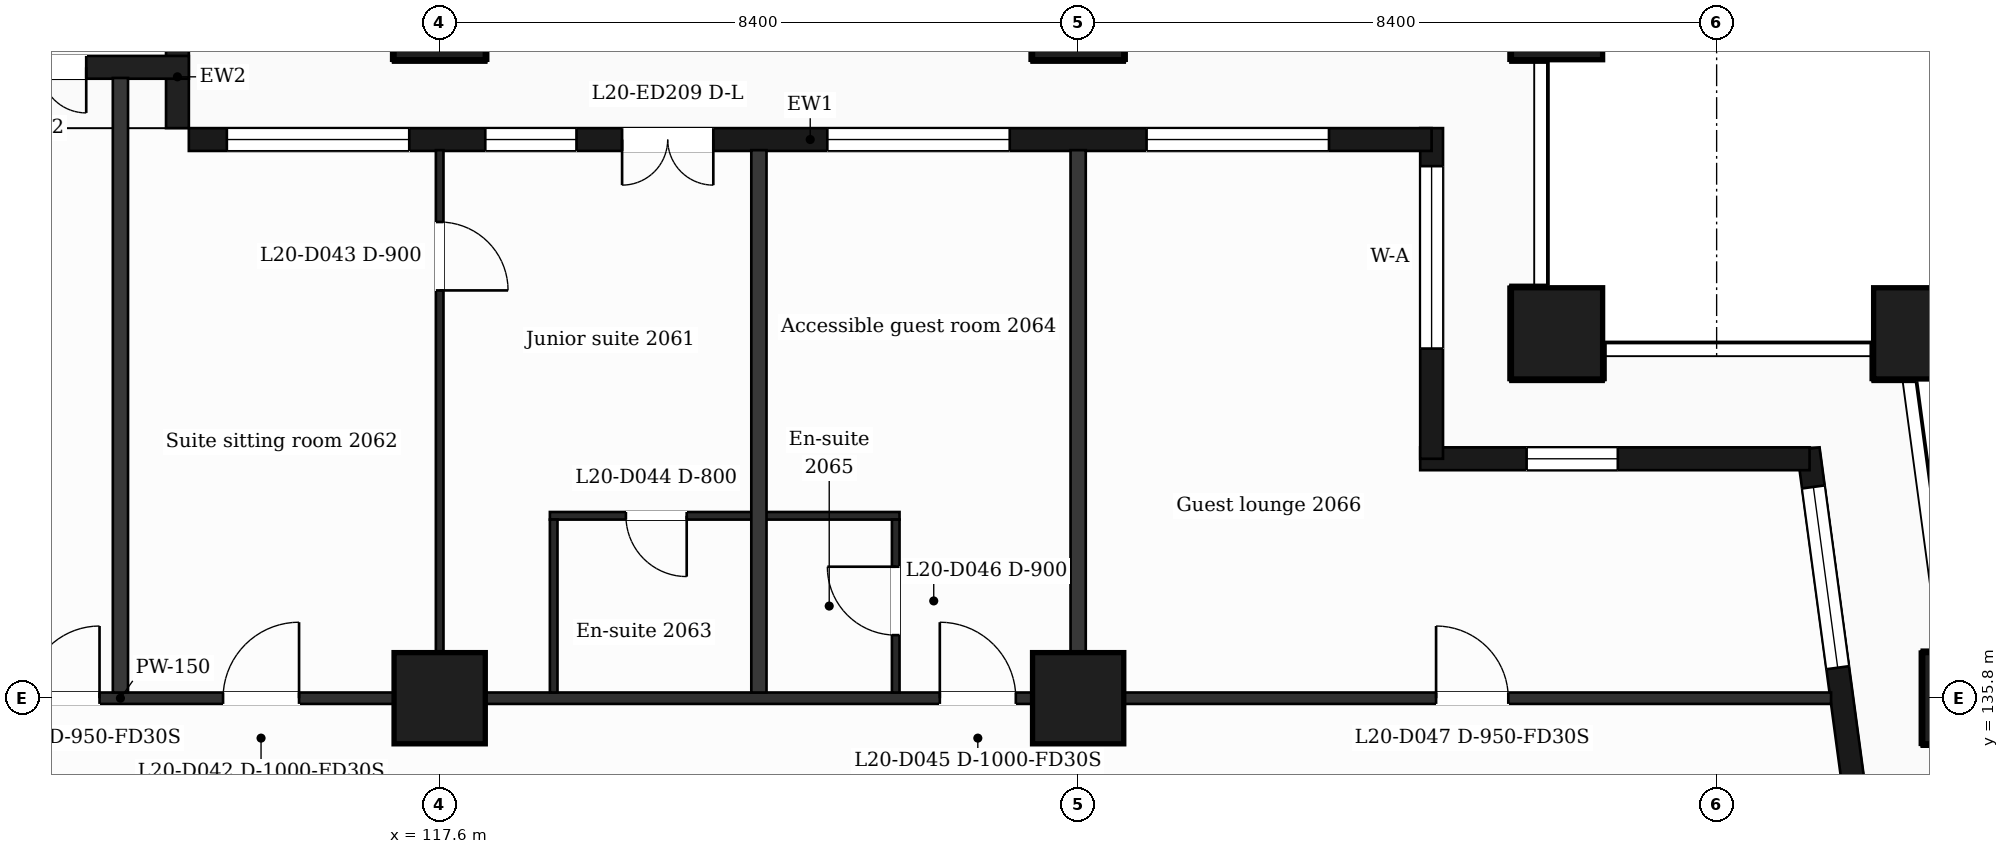
"""IFC4 building model, lengths in metres.
Left out: names, types, materials, properties, quantities, classifications, styles, units other than length and angle.
Written with IfcOpenShell. Run it as: python <this file> out.ifc"""

import sys

from ifc_helpers import new_model, si_unit, direction, frame, frame_2d, origin, origin_2d, place, context, subcontext, project, spatial, rectangle, extrude, element, fill, save


model = new_model("IFC4")
c1 = context("Model", 3, precision=1e-05, world=origin(), true_north=direction((0.0, 1.0)))
c2 = subcontext(c1, "Body", "Model", "MODEL_VIEW")
j1 = project(units=[si_unit("LENGTHUNIT", "METRE"), si_unit("PLANEANGLEUNIT", "RADIAN")], contexts=[c1])
p1 = place(None, origin())
s1 = spatial("IfcSite", under=j1, at=p1, CompositionType="ELEMENT")
p2 = place(p1, origin())
s2 = spatial("IfcBuilding", under=s1, at=p2, CompositionType="ELEMENT")
p3 = place(p2, frame((0.0, 0.0, 91.0)))
s3 = spatial("IfcBuildingStorey", under=s2, at=p3, CompositionType="ELEMENT", Elevation=91.0)
for number, where, z_axis, x_axis in (
    (1, (132.3, 140.6, 0.0), (0.0, 0.0, 1.0), (1.0, 0.0, 0.0)),
    (2, (137.065, 140.6, 0.0), (0.0, 0.0, 1.0), (1.0, 0.0, 0.0)),
    (3, (117.6, 135.8, 0.0), (0.0, 0.0, 1.0), (1.0, 0.0, 0.0)),
    (4, (126.0, 135.8, 0.0), (0.0, 0.0, 1.0), (1.0, 0.0, 0.0)),
    (5, (137.711, 135.8, 0.0), (0.0, 0.0, 1.0), (1.0, 0.0, 0.0)),
    (6, (117.6, 144.8, 0.0), (0.0, 0.0, 1.0), (1.0, 0.0, 0.0)),
    (7, (126.0, 144.8, 0.0), (0.0, 0.0, 1.0), (1.0, 0.0, 0.0)),
    (8, (132.3, 144.8, 0.0), (0.0, 0.0, 1.0), (1.0, 0.0, 0.0)),
):
    element("IfcColumn", number, at=place(p3, frame(where, z_axis=z_axis, x_axis=x_axis)), inside=s3, PredefinedType="COLUMN", context=c2, shape_type="SweptSolid", body=[
        extrude(rectangle(XDim=1.2, YDim=1.2, at=origin_2d()), origin(), (0.0, 0.0, 1.0), 3.7),
    ])
p4 = place(p3, frame((136.504, 132.4, 0.0), z_axis=(0.0, 0.0, 1.0), x_axis=(-0.133399697462, 0.99106231929, 0.0)))
e9 = element("IfcWall", 9, at=p4, inside=s3, PredefinedType="SOLIDWALL", context=c2, shape_type="SweptSolid", body=[
    extrude(rectangle(XDim=6.74, YDim=0.3, at=frame_2d((3.37, 0.0))), origin(), (0.0, 0.0, 1.0), 3.38),
])
p5 = place(p4, frame((1.115, 0.0, 0.0)))
e10 = element("IfcOpeningElement", 10, at=p5, cuts=e9, PredefinedType="OPENING", context=c2, shape_type="SweptSolid", body=[
    extrude(rectangle(XDim=1.2, YDim=2.4, at=frame_2d((0.6, 1.2))), frame((0.0, 0.16, 0.0), z_axis=(0.0, -1.0, 0.0), x_axis=(1.0, 0.0, 0.0)), (0.0, 0.0, 1.0), 0.32),
])
p6 = place(p4, frame((3.835, 0.0, 0.9)))
e11 = element("IfcOpeningElement", 11, at=p6, cuts=e9, PredefinedType="OPENING", context=c2, shape_type="SweptSolid", body=[
    extrude(rectangle(XDim=2.4, YDim=2.1, at=frame_2d((1.2, 1.05))), frame((0.0, 0.16, 0.0), z_axis=(0.0, -1.0, 0.0), x_axis=(1.0, 0.0, 0.0)), (0.0, 0.0, 1.0), 0.32),
])
p7 = place(p3, frame((135.623, 138.95, 0.0), z_axis=(0.0, 0.0, 1.0), x_axis=(-1.0, 0.0, 0.0)))
e12 = element("IfcWall", 12, at=p7, inside=s3, PredefinedType="SOLIDWALL", context=c2, shape_type="SweptSolid", body=[
    extrude(rectangle(XDim=5.123, YDim=0.3, at=frame_2d((2.561, 0.0))), origin(), (0.0, 0.0, 1.0), 3.38),
])
p8 = place(p7, frame((2.523, 0.0, 0.9)))
e13 = element("IfcOpeningElement", 13, at=p8, cuts=e12, PredefinedType="OPENING", context=c2, shape_type="SweptSolid", body=[
    extrude(rectangle(XDim=1.2, YDim=2.1, at=frame_2d((0.6, 1.05))), frame((0.0, 0.16, 0.0), z_axis=(0.0, -1.0, 0.0), x_axis=(1.0, 0.0, 0.0)), (0.0, 0.0, 1.0), 0.32),
])
p9 = place(p3, frame((130.65, 138.95, 0.0), z_axis=(0.0, 0.0, 1.0), x_axis=(0.0, 1.0, 0.0)))
e14 = element("IfcWall", 14, at=p9, inside=s3, PredefinedType="SOLIDWALL", context=c2, shape_type="SweptSolid", body=[
    extrude(rectangle(XDim=4.35, YDim=0.3, at=frame_2d((2.175, 0.0))), origin(), (0.0, 0.0, 1.0), 3.38),
])
p10 = place(p9, frame((1.45, 0.0, 0.9)))
e15 = element("IfcOpeningElement", 15, at=p10, cuts=e14, PredefinedType="OPENING", context=c2, shape_type="SweptSolid", body=[
    extrude(rectangle(XDim=2.4, YDim=2.1, at=frame_2d((1.2, 1.05))), frame((0.0, 0.16, 0.0), z_axis=(0.0, -1.0, 0.0), x_axis=(1.0, 0.0, 0.0)), (0.0, 0.0, 1.0), 0.32),
])
p11 = place(p3, frame((130.65, 143.15, 0.0), z_axis=(0.0, 0.0, 1.0), x_axis=(-1.0, 0.0, 0.0)))
e16 = element("IfcWall", 16, at=p11, inside=s3, PredefinedType="SOLIDWALL", context=c2, shape_type="SweptSolid", body=[
    extrude(rectangle(XDim=16.35, YDim=0.3, at=frame_2d((8.175, 0.0))), origin(), (0.0, 0.0, 1.0), 3.38),
])
p12 = place(p11, frame((1.35, 0.0, 0.9)))
e17 = element("IfcOpeningElement", 17, at=p12, cuts=e16, PredefinedType="OPENING", context=c2, shape_type="SweptSolid", body=[
    extrude(rectangle(XDim=2.4, YDim=2.1, at=frame_2d((1.2, 1.05))), frame((0.0, 0.16, 0.0), z_axis=(0.0, -1.0, 0.0), x_axis=(1.0, 0.0, 0.0)), (0.0, 0.0, 1.0), 0.32),
])
p13 = place(p11, frame((5.55, 0.0, 0.9)))
e18 = element("IfcOpeningElement", 18, at=p13, cuts=e16, PredefinedType="OPENING", context=c2, shape_type="SweptSolid", body=[
    extrude(rectangle(XDim=2.4, YDim=2.1, at=frame_2d((1.2, 1.05))), frame((0.0, 0.16, 0.0), z_axis=(0.0, -1.0, 0.0), x_axis=(1.0, 0.0, 0.0)), (0.0, 0.0, 1.0), 0.32),
])
p14 = place(p11, frame((9.45, 0.0, 0.0)))
e19 = element("IfcOpeningElement", 19, at=p14, cuts=e16, PredefinedType="OPENING", context=c2, shape_type="SweptSolid", body=[
    extrude(rectangle(XDim=1.2, YDim=2.4, at=frame_2d((0.6, 1.2))), frame((0.0, 0.16, 0.0), z_axis=(0.0, -1.0, 0.0), x_axis=(1.0, 0.0, 0.0)), (0.0, 0.0, 1.0), 0.32),
])
p15 = place(p11, frame((11.25, 0.0, 0.9)))
e20 = element("IfcOpeningElement", 20, at=p15, cuts=e16, PredefinedType="OPENING", context=c2, shape_type="SweptSolid", body=[
    extrude(rectangle(XDim=1.2, YDim=2.1, at=frame_2d((0.6, 1.05))), frame((0.0, 0.16, 0.0), z_axis=(0.0, -1.0, 0.0), x_axis=(1.0, 0.0, 0.0)), (0.0, 0.0, 1.0), 0.32),
])
p16 = place(p11, frame((13.45, 0.0, 0.9)))
e21 = element("IfcOpeningElement", 21, at=p16, cuts=e16, PredefinedType="OPENING", context=c2, shape_type="SweptSolid", body=[
    extrude(rectangle(XDim=2.4, YDim=2.1, at=frame_2d((1.2, 1.05))), frame((0.0, 0.16, 0.0), z_axis=(0.0, -1.0, 0.0), x_axis=(1.0, 0.0, 0.0)), (0.0, 0.0, 1.0), 0.32),
])
p17 = place(p3, frame((114.15, 143.3, 0.0), z_axis=(0.0, 0.0, 1.0), x_axis=(0.0, 1.0, 0.0)))
e22 = element("IfcWall", 22, at=p17, inside=s3, PredefinedType="SOLIDWALL", context=c2, shape_type="SweptSolid", body=[
    extrude(rectangle(XDim=1.35, YDim=0.3, at=frame_2d((0.675, 0.0))), origin(), (0.0, 0.0, 1.0), 3.38),
])
p18 = place(p3, frame((114.3, 144.1, 0.0), z_axis=(0.0, 0.0, 1.0), x_axis=(-1.0, 0.0, 0.0)))
e23 = element("IfcWall", 23, at=p18, inside=s3, PredefinedType="SOLIDWALL", context=c2, shape_type="SweptSolid", body=[
    extrude(rectangle(XDim=3.9, YDim=0.3, at=frame_2d((1.95, 0.0))), origin(), (0.0, 0.0, 1.0), 3.38),
])
p19 = place(p18, frame((1.35, 0.0, 0.0)))
e24 = element("IfcOpeningElement", 24, at=p19, cuts=e23, PredefinedType="OPENING", context=c2, shape_type="SweptSolid", body=[
    extrude(rectangle(XDim=1.2, YDim=2.4, at=frame_2d((0.6, 1.2))), frame((0.0, 0.16, 0.0), z_axis=(0.0, -1.0, 0.0), x_axis=(1.0, 0.0, 0.0)), (0.0, 0.0, 1.0), 0.32),
])
p20 = place(p3, frame((90.895, 135.8, 0.0), z_axis=(0.0, 0.0, 1.0), x_axis=(1.0, 0.0, 0.0)))
e25 = element("IfcWall", 25, at=p20, inside=s3, PredefinedType="PARTITIONING", context=c2, shape_type="SweptSolid", body=[
    extrude(rectangle(XDim=45.011, YDim=0.15, at=frame_2d((22.505, 0.0))), origin(), (0.0, 0.0, 1.0), 3.38),
])
p21 = place(p20, frame((7.675, 0.0, 0.0)))
e26 = element("IfcOpeningElement", 26, at=p21, cuts=e25, PredefinedType="OPENING", context=c2, shape_type="SweptSolid", body=[
    extrude(rectangle(XDim=1.0, YDim=2.1, at=frame_2d((0.5, 1.05))), frame((0.0, 0.085, 0.0), z_axis=(0.0, -1.0, 0.0), x_axis=(1.0, 0.0, 0.0)), (0.0, 0.0, 1.0), 0.17),
])
p22 = place(p20, frame((11.755, 0.0, 0.0)))
e27 = element("IfcOpeningElement", 27, at=p22, cuts=e25, PredefinedType="OPENING", context=c2, shape_type="SweptSolid", body=[
    extrude(rectangle(XDim=1.0, YDim=2.1, at=frame_2d((0.5, 1.05))), frame((0.0, 0.085, 0.0), z_axis=(0.0, -1.0, 0.0), x_axis=(1.0, 0.0, 0.0)), (0.0, 0.0, 1.0), 0.17),
])
p23 = place(p20, frame((21.281, 0.0, 0.0)))
e28 = element("IfcOpeningElement", 28, at=p23, cuts=e25, PredefinedType="OPENING", context=c2, shape_type="SweptSolid", body=[
    extrude(rectangle(XDim=0.95, YDim=2.1, at=frame_2d((0.475, 1.05))), frame((0.0, 0.085, 0.0), z_axis=(0.0, -1.0, 0.0), x_axis=(1.0, 0.0, 0.0)), (0.0, 0.0, 1.0), 0.17),
])
p24 = place(p20, frame((23.855, 0.0, 0.0)))
e29 = element("IfcOpeningElement", 29, at=p24, cuts=e25, PredefinedType="OPENING", context=c2, shape_type="SweptSolid", body=[
    extrude(rectangle(XDim=1.0, YDim=2.1, at=frame_2d((0.5, 1.05))), frame((0.0, 0.085, 0.0), z_axis=(0.0, -1.0, 0.0), x_axis=(1.0, 0.0, 0.0)), (0.0, 0.0, 1.0), 0.17),
])
p25 = place(p20, frame((33.285, 0.0, 0.0)))
e30 = element("IfcOpeningElement", 30, at=p25, cuts=e25, PredefinedType="OPENING", context=c2, shape_type="SweptSolid", body=[
    extrude(rectangle(XDim=1.0, YDim=2.1, at=frame_2d((0.5, 1.05))), frame((0.0, 0.085, 0.0), z_axis=(0.0, -1.0, 0.0), x_axis=(1.0, 0.0, 0.0)), (0.0, 0.0, 1.0), 0.17),
])
p26 = place(p20, frame((39.814, 0.0, 0.0)))
e31 = element("IfcOpeningElement", 31, at=p26, cuts=e25, PredefinedType="OPENING", context=c2, shape_type="SweptSolid", body=[
    extrude(rectangle(XDim=0.95, YDim=2.1, at=frame_2d((0.475, 1.05))), frame((0.0, 0.085, 0.0), z_axis=(0.0, -1.0, 0.0), x_axis=(1.0, 0.0, 0.0)), (0.0, 0.0, 1.0), 0.17),
])
p27 = place(p3, frame((119.05, 138.2, 0.0), z_axis=(0.0, 0.0, 1.0), x_axis=(1.0, 0.0, 0.0)))
e32 = element("IfcWall", 32, at=p27, inside=s3, PredefinedType="PARTITIONING", context=c2, shape_type="SweptSolid", body=[
    extrude(rectangle(XDim=4.6, YDim=0.1, at=frame_2d((2.3, 0.0))), origin(), (0.0, 0.0, 1.0), 3.38),
])
p28 = place(p27, frame((1.0, 0.0, 0.0)))
e33 = element("IfcOpeningElement", 33, at=p28, cuts=e32, PredefinedType="OPENING", context=c2, shape_type="SweptSolid", body=[
    extrude(rectangle(XDim=0.8, YDim=2.1, at=frame_2d((0.4, 1.05))), frame((0.0, 0.06, 0.0), z_axis=(0.0, -1.0, 0.0), x_axis=(1.0, 0.0, 0.0)), (0.0, 0.0, 1.0), 0.12),
])
p29 = place(p3, frame((113.4, 135.875, 0.0), z_axis=(0.0, 0.0, 1.0), x_axis=(0.0, 1.0, 0.0)))
e34 = element("IfcWall", 34, at=p29, inside=s3, PredefinedType="PARTITIONING", context=c2, shape_type="SweptSolid", body=[
    extrude(rectangle(XDim=8.085, YDim=0.2, at=frame_2d((4.042, 0.0))), origin(), (0.0, 0.0, 1.0), 3.38),
])
p30 = place(p3, frame((117.6, 135.875, 0.0), z_axis=(0.0, 0.0, 1.0), x_axis=(0.0, 1.0, 0.0)))
e35 = element("IfcWall", 35, at=p30, inside=s3, PredefinedType="PARTITIONING", context=c2, shape_type="SweptSolid", body=[
    extrude(rectangle(XDim=7.135, YDim=0.1, at=frame_2d((3.567, 0.0))), origin(), (0.0, 0.0, 1.0), 3.38),
])
p31 = place(p30, frame((5.29, 0.0, 0.0)))
e36 = element("IfcOpeningElement", 36, at=p31, cuts=e35, PredefinedType="OPENING", context=c2, shape_type="SweptSolid", body=[
    extrude(rectangle(XDim=0.9, YDim=2.1, at=frame_2d((0.45, 1.05))), frame((0.0, 0.06, 0.0), z_axis=(0.0, -1.0, 0.0), x_axis=(1.0, 0.0, 0.0)), (0.0, 0.0, 1.0), 0.12),
])
p32 = place(p3, frame((119.1, 135.875, 0.0), z_axis=(0.0, 0.0, 1.0), x_axis=(0.0, 1.0, 0.0)))
e37 = element("IfcWall", 37, at=p32, inside=s3, PredefinedType="PARTITIONING", context=c2, shape_type="SweptSolid", body=[
    extrude(rectangle(XDim=2.275, YDim=0.1, at=frame_2d((1.137, 0.0))), origin(), (0.0, 0.0, 1.0), 3.38),
])
p33 = place(p3, frame((121.8, 135.875, 0.0), z_axis=(0.0, 0.0, 1.0), x_axis=(0.0, 1.0, 0.0)))
e38 = element("IfcWall", 38, at=p33, inside=s3, PredefinedType="PARTITIONING", context=c2, shape_type="SweptSolid", body=[
    extrude(rectangle(XDim=7.135, YDim=0.2, at=frame_2d((3.567, 0.0))), origin(), (0.0, 0.0, 1.0), 3.38),
])
p34 = place(p3, frame((123.6, 135.875, 0.0), z_axis=(0.0, 0.0, 1.0), x_axis=(0.0, 1.0, 0.0)))
e39 = element("IfcWall", 39, at=p34, inside=s3, PredefinedType="PARTITIONING", context=c2, shape_type="SweptSolid", body=[
    extrude(rectangle(XDim=2.275, YDim=0.1, at=frame_2d((1.137, 0.0))), origin(), (0.0, 0.0, 1.0), 3.38),
])
p35 = place(p34, frame((0.755, 0.0, 0.0)))
e40 = element("IfcOpeningElement", 40, at=p35, cuts=e39, PredefinedType="OPENING", context=c2, shape_type="SweptSolid", body=[
    extrude(rectangle(XDim=0.9, YDim=2.1, at=frame_2d((0.45, 1.05))), frame((0.0, 0.06, 0.0), z_axis=(0.0, -1.0, 0.0), x_axis=(1.0, 0.0, 0.0)), (0.0, 0.0, 1.0), 0.12),
])
p36 = place(p3, frame((126.0, 135.875, 0.0), z_axis=(0.0, 0.0, 1.0), x_axis=(0.0, 1.0, 0.0)))
e41 = element("IfcWall", 41, at=p36, inside=s3, PredefinedType="PARTITIONING", context=c2, shape_type="SweptSolid", body=[
    extrude(rectangle(XDim=7.135, YDim=0.2, at=frame_2d((3.567, 0.0))), origin(), (0.0, 0.0, 1.0), 3.38),
])
p37 = place(p6, origin())
e42 = element("IfcWindow", 42, at=p37, inside=s3, PartitioningType="SINGLE_PANEL", PredefinedType="WINDOW", context=c2, shape_type="SweptSolid", body=[
    extrude(rectangle(XDim=2.4, YDim=2.1, at=frame_2d((1.2, 1.05))), frame((0.0, 0.03, 0.0), z_axis=(0.0, -1.0, 0.0), x_axis=(1.0, 0.0, 0.0)), (0.0, 0.0, 1.0), 0.06),
])
fill(e11, e42)
p38 = place(p8, origin())
e43 = element("IfcWindow", 43, at=p38, inside=s3, PartitioningType="SINGLE_PANEL", PredefinedType="WINDOW", context=c2, shape_type="SweptSolid", body=[
    extrude(rectangle(XDim=1.2, YDim=2.1, at=frame_2d((0.6, 1.05))), frame((0.0, 0.03, 0.0), z_axis=(0.0, -1.0, 0.0), x_axis=(1.0, 0.0, 0.0)), (0.0, 0.0, 1.0), 0.06),
])
fill(e13, e43)
p39 = place(p10, origin())
e44 = element("IfcWindow", 44, at=p39, inside=s3, PartitioningType="SINGLE_PANEL", PredefinedType="WINDOW", context=c2, shape_type="SweptSolid", body=[
    extrude(rectangle(XDim=2.4, YDim=2.1, at=frame_2d((1.2, 1.05))), frame((0.0, 0.03, 0.0), z_axis=(0.0, -1.0, 0.0), x_axis=(1.0, 0.0, 0.0)), (0.0, 0.0, 1.0), 0.06),
])
fill(e15, e44)
p40 = place(p12, origin())
e45 = element("IfcWindow", 45, at=p40, inside=s3, PartitioningType="SINGLE_PANEL", PredefinedType="WINDOW", context=c2, shape_type="SweptSolid", body=[
    extrude(rectangle(XDim=2.4, YDim=2.1, at=frame_2d((1.2, 1.05))), frame((0.0, 0.03, 0.0), z_axis=(0.0, -1.0, 0.0), x_axis=(1.0, 0.0, 0.0)), (0.0, 0.0, 1.0), 0.06),
])
fill(e17, e45)
p41 = place(p13, origin())
e46 = element("IfcWindow", 46, at=p41, inside=s3, PartitioningType="SINGLE_PANEL", PredefinedType="WINDOW", context=c2, shape_type="SweptSolid", body=[
    extrude(rectangle(XDim=2.4, YDim=2.1, at=frame_2d((1.2, 1.05))), frame((0.0, 0.03, 0.0), z_axis=(0.0, -1.0, 0.0), x_axis=(1.0, 0.0, 0.0)), (0.0, 0.0, 1.0), 0.06),
])
fill(e18, e46)
p42 = place(p14, origin())
e47 = element("IfcDoor", 47, at=p42, inside=s3, OperationType="DOUBLE_DOOR_SINGLE_SWING", PredefinedType="DOOR", context=c2, shape_type="SweptSolid", body=[
    extrude(rectangle(XDim=1.2, YDim=2.4, at=frame_2d((0.6, 1.2))), frame((0.0, 0.025, 0.0), z_axis=(0.0, -1.0, 0.0), x_axis=(1.0, 0.0, 0.0)), (0.0, 0.0, 1.0), 0.05),
])
fill(e19, e47)
p43 = place(p15, origin())
e48 = element("IfcWindow", 48, at=p43, inside=s3, PartitioningType="SINGLE_PANEL", PredefinedType="WINDOW", context=c2, shape_type="SweptSolid", body=[
    extrude(rectangle(XDim=1.2, YDim=2.1, at=frame_2d((0.6, 1.05))), frame((0.0, 0.03, 0.0), z_axis=(0.0, -1.0, 0.0), x_axis=(1.0, 0.0, 0.0)), (0.0, 0.0, 1.0), 0.06),
])
fill(e20, e48)
p44 = place(p16, origin())
e49 = element("IfcWindow", 49, at=p44, inside=s3, PartitioningType="SINGLE_PANEL", PredefinedType="WINDOW", context=c2, shape_type="SweptSolid", body=[
    extrude(rectangle(XDim=2.4, YDim=2.1, at=frame_2d((1.2, 1.05))), frame((0.0, 0.03, 0.0), z_axis=(0.0, -1.0, 0.0), x_axis=(1.0, 0.0, 0.0)), (0.0, 0.0, 1.0), 0.06),
])
fill(e21, e49)
p45 = place(p19, origin())
e50 = element("IfcDoor", 50, at=p45, inside=s3, OperationType="DOUBLE_DOOR_SINGLE_SWING", PredefinedType="DOOR", context=c2, shape_type="SweptSolid", body=[
    extrude(rectangle(XDim=1.2, YDim=2.4, at=frame_2d((0.6, 1.2))), frame((0.0, 0.025, 0.0), z_axis=(0.0, -1.0, 0.0), x_axis=(1.0, 0.0, 0.0)), (0.0, 0.0, 1.0), 0.05),
])
fill(e24, e50)
p46 = place(p23, origin())
e51 = element("IfcDoor", 51, at=p46, inside=s3, OperationType="SINGLE_SWING_RIGHT", PredefinedType="DOOR", context=c2, shape_type="SweptSolid", body=[
    extrude(rectangle(XDim=0.95, YDim=2.1, at=frame_2d((0.475, 1.05))), frame((0.0, 0.025, 0.0), z_axis=(0.0, -1.0, 0.0), x_axis=(1.0, 0.0, 0.0)), (0.0, 0.0, 1.0), 0.05),
])
fill(e28, e51)
p47 = place(p24, origin())
e52 = element("IfcDoor", 52, at=p47, inside=s3, OperationType="SINGLE_SWING_RIGHT", PredefinedType="DOOR", context=c2, shape_type="SweptSolid", body=[
    extrude(rectangle(XDim=1.0, YDim=2.1, at=frame_2d((0.5, 1.05))), frame((0.0, 0.025, 0.0), z_axis=(0.0, -1.0, 0.0), x_axis=(1.0, 0.0, 0.0)), (0.0, 0.0, 1.0), 0.05),
])
fill(e29, e52)
p48 = place(p31, origin())
e53 = element("IfcDoor", 53, at=p48, inside=s3, OperationType="SINGLE_SWING_LEFT", PredefinedType="DOOR", context=c2, shape_type="SweptSolid", body=[
    extrude(rectangle(XDim=0.9, YDim=2.1, at=frame_2d((0.45, 1.05))), frame((0.0, 0.025, 0.0), z_axis=(0.0, -1.0, 0.0), x_axis=(1.0, 0.0, 0.0)), (0.0, 0.0, 1.0), 0.05),
])
fill(e36, e53)
p49 = place(p28, origin())
e54 = element("IfcDoor", 54, at=p49, inside=s3, OperationType="SINGLE_SWING_RIGHT", PredefinedType="DOOR", context=c2, shape_type="SweptSolid", body=[
    extrude(rectangle(XDim=0.8, YDim=2.1, at=frame_2d((0.4, 1.05))), frame((0.0, 0.025, 0.0), z_axis=(0.0, -1.0, 0.0), x_axis=(1.0, 0.0, 0.0)), (0.0, 0.0, 1.0), 0.05),
])
fill(e33, e54)
p50 = place(p25, origin())
e55 = element("IfcDoor", 55, at=p50, inside=s3, OperationType="SINGLE_SWING_LEFT", PredefinedType="DOOR", context=c2, shape_type="SweptSolid", body=[
    extrude(rectangle(XDim=1.0, YDim=2.1, at=frame_2d((0.5, 1.05))), frame((0.0, 0.025, 0.0), z_axis=(0.0, -1.0, 0.0), x_axis=(1.0, 0.0, 0.0)), (0.0, 0.0, 1.0), 0.05),
])
fill(e30, e55)
p51 = place(p35, origin())
e56 = element("IfcDoor", 56, at=p51, inside=s3, OperationType="SINGLE_SWING_RIGHT", PredefinedType="DOOR", context=c2, shape_type="SweptSolid", body=[
    extrude(rectangle(XDim=0.9, YDim=2.1, at=frame_2d((0.45, 1.05))), frame((0.0, 0.025, 0.0), z_axis=(0.0, -1.0, 0.0), x_axis=(1.0, 0.0, 0.0)), (0.0, 0.0, 1.0), 0.05),
])
fill(e40, e56)
p52 = place(p26, origin())
e57 = element("IfcDoor", 57, at=p52, inside=s3, OperationType="SINGLE_SWING_LEFT", PredefinedType="DOOR", context=c2, shape_type="SweptSolid", body=[
    extrude(rectangle(XDim=0.95, YDim=2.1, at=frame_2d((0.475, 1.05))), frame((0.0, 0.025, 0.0), z_axis=(0.0, -1.0, 0.0), x_axis=(1.0, 0.0, 0.0)), (0.0, 0.0, 1.0), 0.05),
])
fill(e31, e57)
save(model, sys.argv[1])
